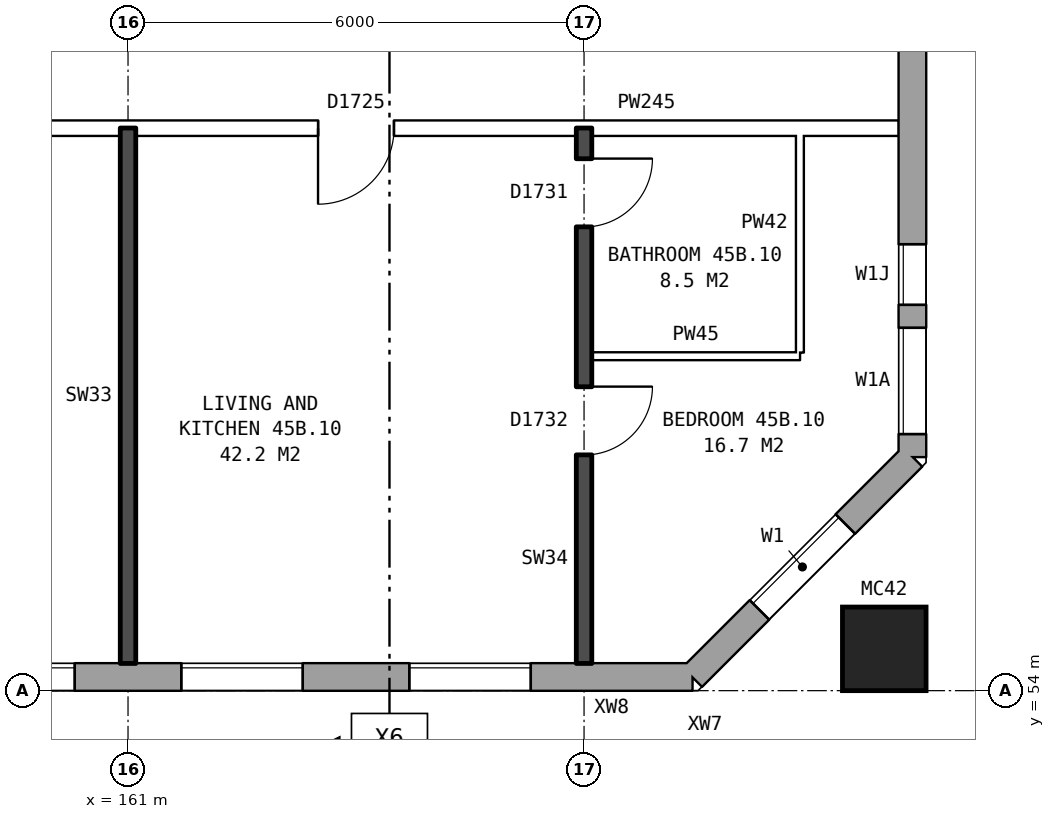
"""IFC4 building model, lengths in metres.
Left out: names, types, materials, properties, quantities, classifications, styles, units other than length and angle.
Written with IfcOpenShell. Run it as: python <this file> out.ifc"""

import sys

from ifc_helpers import new_model, si_unit, direction, frame, frame_2d, origin, origin_2d, place, context, subcontext, project, spatial, rectangle, hollow_rectangle, extrude, element, fill, save


model = new_model("IFC4")
c1 = context("Model", 3, precision=1e-05, world=origin(), true_north=direction((0.0, 1.0)))
c2 = subcontext(c1, "Body", "Model", "MODEL_VIEW")
j1 = project(units=[si_unit("LENGTHUNIT", "METRE"), si_unit("PLANEANGLEUNIT", "RADIAN")], contexts=[c1])
p1 = place(None, origin())
s1 = spatial("IfcSite", under=j1, at=p1, CompositionType="ELEMENT")
p2 = place(p1, origin())
s2 = spatial("IfcBuilding", under=s1, at=p2, CompositionType="ELEMENT")
p3 = place(p2, frame((0.0, 0.0, 160.9)))
s3 = spatial("IfcBuildingStorey", under=s2, at=p3, CompositionType="ELEMENT", Elevation=160.9)
p4 = place(p3, frame((170.95, 54.55, 0.0), z_axis=(0.0, 0.0, 1.0), x_axis=(1.0, 0.0, 0.0)))
e1 = element("IfcColumn", 1, at=p4, inside=s3, PredefinedType="COLUMN", context=c2, shape_type="SweptSolid", body=[
    extrude(hollow_rectangle(XDim=1.1, YDim=1.1, WallThickness=0.06, at=origin_2d()), origin(), (0.0, 0.0, 1.0), 3.1),
])
p5 = place(p3, frame((134.075, 54.18, 0.0), z_axis=(0.0, 0.0, 1.0), x_axis=(1.0, 0.0, 0.0)))
e2 = element("IfcWall", 2, at=p5, inside=s3, PredefinedType="STANDARD", context=c2, shape_type="SweptSolid", body=[
    extrude(rectangle(XDim=34.351, YDim=0.36, at=frame_2d((17.175, 0.0))), origin(), (0.0, 0.0, 1.0), 2.85),
])
p6 = place(p5, frame((0.625, 0.0, 0.8)))
e3 = element("IfcOpeningElement", 3, at=p6, cuts=e2, PredefinedType="OPENING", context=c2, shape_type="SweptSolid", body=[
    extrude(rectangle(XDim=1.6, YDim=1.8, at=frame_2d((0.8, 0.9))), frame((0.0, 0.19, 0.0), z_axis=(0.0, -1.0, 0.0), x_axis=(1.0, 0.0, 0.0)), (0.0, 0.0, 1.0), 0.38),
])
p7 = place(p5, frame((3.625, 0.0, 0.8)))
e4 = element("IfcOpeningElement", 4, at=p7, cuts=e2, PredefinedType="OPENING", context=c2, shape_type="SweptSolid", body=[
    extrude(rectangle(XDim=1.6, YDim=1.8, at=frame_2d((0.8, 0.9))), frame((0.0, 0.19, 0.0), z_axis=(0.0, -1.0, 0.0), x_axis=(1.0, 0.0, 0.0)), (0.0, 0.0, 1.0), 0.38),
])
p8 = place(p5, frame((6.625, 0.0, 0.8)))
e5 = element("IfcOpeningElement", 5, at=p8, cuts=e2, PredefinedType="OPENING", context=c2, shape_type="SweptSolid", body=[
    extrude(rectangle(XDim=1.6, YDim=1.8, at=frame_2d((0.8, 0.9))), frame((0.0, 0.19, 0.0), z_axis=(0.0, -1.0, 0.0), x_axis=(1.0, 0.0, 0.0)), (0.0, 0.0, 1.0), 0.38),
])
p9 = place(p5, frame((9.625, 0.0, 0.8)))
e6 = element("IfcOpeningElement", 6, at=p9, cuts=e2, PredefinedType="OPENING", context=c2, shape_type="SweptSolid", body=[
    extrude(rectangle(XDim=1.6, YDim=1.8, at=frame_2d((0.8, 0.9))), frame((0.0, 0.19, 0.0), z_axis=(0.0, -1.0, 0.0), x_axis=(1.0, 0.0, 0.0)), (0.0, 0.0, 1.0), 0.38),
])
p10 = place(p5, frame((12.625, 0.0, 0.15)))
e7 = element("IfcOpeningElement", 7, at=p10, cuts=e2, PredefinedType="OPENING", context=c2, shape_type="SweptSolid", body=[
    extrude(rectangle(XDim=0.8, YDim=0.9, at=frame_2d((0.4, 0.45))), frame((0.0, 0.19, 0.0), z_axis=(0.0, -1.0, 0.0), x_axis=(1.0, 0.0, 0.0)), (0.0, 0.0, 1.0), 0.38),
])
p11 = place(p5, frame((15.625, 0.0, 0.8)))
e8 = element("IfcOpeningElement", 8, at=p11, cuts=e2, PredefinedType="OPENING", context=c2, shape_type="SweptSolid", body=[
    extrude(rectangle(XDim=1.6, YDim=1.8, at=frame_2d((0.8, 0.9))), frame((0.0, 0.19, 0.0), z_axis=(0.0, -1.0, 0.0), x_axis=(1.0, 0.0, 0.0)), (0.0, 0.0, 1.0), 0.38),
])
p12 = place(p5, frame((18.625, 0.0, 0.8)))
e9 = element("IfcOpeningElement", 9, at=p12, cuts=e2, PredefinedType="OPENING", context=c2, shape_type="SweptSolid", body=[
    extrude(rectangle(XDim=1.6, YDim=1.8, at=frame_2d((0.8, 0.9))), frame((0.0, 0.19, 0.0), z_axis=(0.0, -1.0, 0.0), x_axis=(1.0, 0.0, 0.0)), (0.0, 0.0, 1.0), 0.38),
])
p13 = place(p5, frame((22.175, 0.0, 1.7)))
e10 = element("IfcOpeningElement", 10, at=p13, cuts=e2, PredefinedType="OPENING", context=c2, shape_type="SweptSolid", body=[
    extrude(rectangle(XDim=0.8, YDim=0.9, at=frame_2d((0.4, 0.45))), frame((0.0, 0.19, 0.0), z_axis=(0.0, -1.0, 0.0), x_axis=(1.0, 0.0, 0.0)), (0.0, 0.0, 1.0), 0.38),
])
p14 = place(p5, frame((24.625, 0.0, 0.8)))
e11 = element("IfcOpeningElement", 11, at=p14, cuts=e2, PredefinedType="OPENING", context=c2, shape_type="SweptSolid", body=[
    extrude(rectangle(XDim=1.6, YDim=1.8, at=frame_2d((0.8, 0.9))), frame((0.0, 0.19, 0.0), z_axis=(0.0, -1.0, 0.0), x_axis=(1.0, 0.0, 0.0)), (0.0, 0.0, 1.0), 0.38),
])
p15 = place(p5, frame((27.625, 0.0, 0.8)))
e12 = element("IfcOpeningElement", 12, at=p15, cuts=e2, PredefinedType="OPENING", context=c2, shape_type="SweptSolid", body=[
    extrude(rectangle(XDim=1.6, YDim=1.8, at=frame_2d((0.8, 0.9))), frame((0.0, 0.19, 0.0), z_axis=(0.0, -1.0, 0.0), x_axis=(1.0, 0.0, 0.0)), (0.0, 0.0, 1.0), 0.38),
])
p16 = place(p5, frame((30.625, 0.0, 0.8)))
e13 = element("IfcOpeningElement", 13, at=p16, cuts=e2, PredefinedType="OPENING", context=c2, shape_type="SweptSolid", body=[
    extrude(rectangle(XDim=1.6, YDim=1.8, at=frame_2d((0.8, 0.9))), frame((0.0, 0.19, 0.0), z_axis=(0.0, -1.0, 0.0), x_axis=(1.0, 0.0, 0.0)), (0.0, 0.0, 1.0), 0.38),
])
p17 = place(p5, frame((13.725, 0.0, 0.25)))
e14 = element("IfcOpeningElement", 14, at=p17, cuts=e2, PredefinedType="OPENING", context=c2, shape_type="SweptSolid", body=[
    extrude(rectangle(XDim=1.0, YDim=1.8, at=frame_2d((0.5, 0.9))), frame((0.0, 0.19, 0.0), z_axis=(0.0, -1.0, 0.0), x_axis=(1.0, 0.0, 0.0)), (0.0, 0.0, 1.0), 0.38),
])
p18 = place(p5, frame((23.275, 0.0, 0.8)))
e15 = element("IfcOpeningElement", 15, at=p18, cuts=e2, PredefinedType="OPENING", context=c2, shape_type="SweptSolid", body=[
    extrude(rectangle(XDim=1.0, YDim=1.8, at=frame_2d((0.5, 0.9))), frame((0.0, 0.19, 0.0), z_axis=(0.0, -1.0, 0.0), x_axis=(1.0, 0.0, 0.0)), (0.0, 0.0, 1.0), 0.38),
])
p19 = place(p3, frame((168.425, 54.18, 0.0), z_axis=(0.0, 0.0, 1.0), x_axis=(0.707106781187, 0.707106781187, 0.0)))
e16 = element("IfcWall", 16, at=p19, inside=s3, PredefinedType="STANDARD", context=c2, shape_type="SweptSolid", body=[
    extrude(rectangle(XDim=4.094, YDim=0.36, at=frame_2d((2.047, 0.0))), origin(), (0.0, 0.0, 1.0), 2.85),
])
p20 = place(p19, frame((1.247, 0.0, 0.8)))
e17 = element("IfcOpeningElement", 17, at=p20, cuts=e16, PredefinedType="OPENING", context=c2, shape_type="SweptSolid", body=[
    extrude(rectangle(XDim=1.6, YDim=1.8, at=frame_2d((0.8, 0.9))), frame((0.0, 0.19, 0.0), z_axis=(0.0, -1.0, 0.0), x_axis=(1.0, 0.0, 0.0)), (0.0, 0.0, 1.0), 0.38),
])
p21 = place(p3, frame((171.32, 57.075, 0.0), z_axis=(0.0, 0.0, 1.0), x_axis=(0.0, 1.0, 0.0)))
e18 = element("IfcWall", 18, at=p21, inside=s3, PredefinedType="STANDARD", context=c2, shape_type="SweptSolid", body=[
    extrude(rectangle(XDim=25.851, YDim=0.36, at=frame_2d((12.925, 0.0))), origin(), (0.0, 0.0, 1.0), 2.85),
])
p22 = place(p21, frame((0.3, 0.0, 0.8)))
e19 = element("IfcOpeningElement", 19, at=p22, cuts=e18, PredefinedType="OPENING", context=c2, shape_type="SweptSolid", body=[
    extrude(rectangle(XDim=1.4, YDim=1.8, at=frame_2d((0.7, 0.9))), frame((0.0, 0.19, 0.0), z_axis=(0.0, -1.0, 0.0), x_axis=(1.0, 0.0, 0.0)), (0.0, 0.0, 1.0), 0.38),
])
p23 = place(p21, frame((5.475, 0.0, 1.4)))
e20 = element("IfcOpeningElement", 20, at=p23, cuts=e18, PredefinedType="OPENING", context=c2, shape_type="SweptSolid", body=[
    extrude(rectangle(XDim=1.4, YDim=1.2, at=frame_2d((0.7, 0.6))), frame((0.0, 0.19, 0.0), z_axis=(0.0, -1.0, 0.0), x_axis=(1.0, 0.0, 0.0)), (0.0, 0.0, 1.0), 0.38),
])
p24 = place(p21, frame((7.625, 0.0, 0.8)))
e21 = element("IfcOpeningElement", 21, at=p24, cuts=e18, PredefinedType="OPENING", context=c2, shape_type="SweptSolid", body=[
    extrude(rectangle(XDim=1.6, YDim=1.8, at=frame_2d((0.8, 0.9))), frame((0.0, 0.19, 0.0), z_axis=(0.0, -1.0, 0.0), x_axis=(1.0, 0.0, 0.0)), (0.0, 0.0, 1.0), 0.38),
])
p25 = place(p21, frame((10.625, 0.0, 0.8)))
e22 = element("IfcOpeningElement", 22, at=p25, cuts=e18, PredefinedType="OPENING", context=c2, shape_type="SweptSolid", body=[
    extrude(rectangle(XDim=1.6, YDim=1.8, at=frame_2d((0.8, 0.9))), frame((0.0, 0.19, 0.0), z_axis=(0.0, -1.0, 0.0), x_axis=(1.0, 0.0, 0.0)), (0.0, 0.0, 1.0), 0.38),
])
p26 = place(p21, frame((13.625, 0.0, 0.8)))
e23 = element("IfcOpeningElement", 23, at=p26, cuts=e18, PredefinedType="OPENING", context=c2, shape_type="SweptSolid", body=[
    extrude(rectangle(XDim=1.6, YDim=1.8, at=frame_2d((0.8, 0.9))), frame((0.0, 0.19, 0.0), z_axis=(0.0, -1.0, 0.0), x_axis=(1.0, 0.0, 0.0)), (0.0, 0.0, 1.0), 0.38),
])
p27 = place(p21, frame((16.625, 0.0, 0.8)))
e24 = element("IfcOpeningElement", 24, at=p27, cuts=e18, PredefinedType="OPENING", context=c2, shape_type="SweptSolid", body=[
    extrude(rectangle(XDim=1.6, YDim=1.8, at=frame_2d((0.8, 0.9))), frame((0.0, 0.19, 0.0), z_axis=(0.0, -1.0, 0.0), x_axis=(1.0, 0.0, 0.0)), (0.0, 0.0, 1.0), 0.38),
])
p28 = place(p21, frame((9.525, 0.0, 0.8)))
e25 = element("IfcOpeningElement", 25, at=p28, cuts=e18, PredefinedType="OPENING", context=c2, shape_type="SweptSolid", body=[
    extrude(rectangle(XDim=0.8, YDim=1.8, at=frame_2d((0.4, 0.9))), frame((0.0, 0.19, 0.0), z_axis=(0.0, -1.0, 0.0), x_axis=(1.0, 0.0, 0.0)), (0.0, 0.0, 1.0), 0.38),
])
p29 = place(p21, frame((22.425, 0.0, 0.8)))
e26 = element("IfcOpeningElement", 26, at=p29, cuts=e18, PredefinedType="OPENING", context=c2, shape_type="SweptSolid", body=[
    extrude(rectangle(XDim=1.0, YDim=1.2, at=frame_2d((0.5, 0.6))), frame((0.0, 0.19, 0.0), z_axis=(0.0, -1.0, 0.0), x_axis=(1.0, 0.0, 0.0)), (0.0, 0.0, 1.0), 0.38),
])
p30 = place(p21, frame((2.0, 0.0, 0.8)))
e27 = element("IfcOpeningElement", 27, at=p30, cuts=e18, PredefinedType="OPENING", context=c2, shape_type="SweptSolid", body=[
    extrude(rectangle(XDim=0.8, YDim=1.5, at=frame_2d((0.4, 0.75))), frame((0.0, 0.19, 0.0), z_axis=(0.0, -1.0, 0.0), x_axis=(1.0, 0.0, 0.0)), (0.0, 0.0, 1.0), 0.38),
])
p31 = place(p21, frame((12.525, 0.0, 0.8)))
e28 = element("IfcOpeningElement", 28, at=p31, cuts=e18, PredefinedType="OPENING", context=c2, shape_type="SweptSolid", body=[
    extrude(rectangle(XDim=0.8, YDim=1.8, at=frame_2d((0.4, 0.9))), frame((0.0, 0.19, 0.0), z_axis=(0.0, -1.0, 0.0), x_axis=(1.0, 0.0, 0.0)), (0.0, 0.0, 1.0), 0.38),
])
p32 = place(p21, frame((15.525, 0.0, 0.8)))
e29 = element("IfcOpeningElement", 29, at=p32, cuts=e18, PredefinedType="OPENING", context=c2, shape_type="SweptSolid", body=[
    extrude(rectangle(XDim=0.8, YDim=1.8, at=frame_2d((0.4, 0.9))), frame((0.0, 0.19, 0.0), z_axis=(0.0, -1.0, 0.0), x_axis=(1.0, 0.0, 0.0)), (0.0, 0.0, 1.0), 0.38),
])
p33 = place(p21, frame((18.525, 0.0, 0.8)))
e30 = element("IfcOpeningElement", 30, at=p33, cuts=e18, PredefinedType="OPENING", context=c2, shape_type="SweptSolid", body=[
    extrude(rectangle(XDim=0.8, YDim=1.8, at=frame_2d((0.4, 0.9))), frame((0.0, 0.19, 0.0), z_axis=(0.0, -1.0, 0.0), x_axis=(1.0, 0.0, 0.0)), (0.0, 0.0, 1.0), 0.38),
])
p34 = place(p21, frame((23.725, 0.0, 0.8)))
e31 = element("IfcOpeningElement", 31, at=p34, cuts=e18, PredefinedType="OPENING", context=c2, shape_type="SweptSolid", body=[
    extrude(rectangle(XDim=1.4, YDim=1.8, at=frame_2d((0.7, 0.9))), frame((0.0, 0.19, 0.0), z_axis=(0.0, -1.0, 0.0), x_axis=(1.0, 0.0, 0.0)), (0.0, 0.0, 1.0), 0.38),
])
p35 = place(p3, frame((167.1, 58.4, 0.0), z_axis=(0.0, 0.0, 1.0), x_axis=(1.0, 0.0, 0.0)))
e32 = element("IfcWall", 32, at=p35, inside=s3, PredefinedType="PARTITIONING", context=c2, shape_type="SweptSolid", body=[
    extrude(rectangle(XDim=2.74, YDim=0.1, at=frame_2d((1.37, 0.0))), origin(), (0.0, 0.0, 1.0), 2.85),
])
p36 = place(p3, frame((155.1, 61.4, 0.0), z_axis=(0.0, 0.0, 1.0), x_axis=(1.0, 0.0, 0.0)))
e33 = element("IfcWall", 33, at=p36, inside=s3, PredefinedType="PARTITIONING", context=c2, shape_type="SweptSolid", body=[
    extrude(rectangle(XDim=16.04, YDim=0.2, at=frame_2d((8.02, 0.0))), origin(), (0.0, 0.0, 1.0), 2.85),
])
p37 = place(p36, frame((3.6, 0.0, 0.0)))
e34 = element("IfcOpeningElement", 34, at=p37, cuts=e33, PredefinedType="OPENING", context=c2, shape_type="SweptSolid", body=[
    extrude(rectangle(XDim=1.0, YDim=2.1, at=frame_2d((0.5, 1.05))), frame((0.0, 0.11, 0.0), z_axis=(0.0, -1.0, 0.0), x_axis=(1.0, 0.0, 0.0)), (0.0, 0.0, 1.0), 0.22),
])
p38 = place(p36, frame((8.4, 0.0, 0.0)))
e35 = element("IfcOpeningElement", 35, at=p38, cuts=e33, PredefinedType="OPENING", context=c2, shape_type="SweptSolid", body=[
    extrude(rectangle(XDim=1.0, YDim=2.1, at=frame_2d((0.5, 1.05))), frame((0.0, 0.11, 0.0), z_axis=(0.0, -1.0, 0.0), x_axis=(1.0, 0.0, 0.0)), (0.0, 0.0, 1.0), 0.22),
])
p39 = place(p3, frame((161.0, 54.36, 0.0), z_axis=(0.0, 0.0, 1.0), x_axis=(0.0, 1.0, 0.0)))
e36 = element("IfcWall", 36, at=p39, inside=s3, PredefinedType="SOLIDWALL", context=c2, shape_type="SweptSolid", body=[
    extrude(rectangle(XDim=7.04, YDim=0.2, at=frame_2d((3.52, 0.0))), origin(), (0.0, 0.0, 1.0), 2.85),
])
p40 = place(p3, frame((167.0, 54.36, 0.0), z_axis=(0.0, 0.0, 1.0), x_axis=(0.0, 1.0, 0.0)))
e37 = element("IfcWall", 37, at=p40, inside=s3, PredefinedType="SOLIDWALL", context=c2, shape_type="SweptSolid", body=[
    extrude(rectangle(XDim=7.04, YDim=0.2, at=frame_2d((3.52, 0.0))), origin(), (0.0, 0.0, 1.0), 2.85),
])
p41 = place(p40, frame((2.74, 0.0, 0.0)))
e38 = element("IfcOpeningElement", 38, at=p41, cuts=e37, PredefinedType="OPENING", context=c2, shape_type="SweptSolid", body=[
    extrude(rectangle(XDim=0.9, YDim=2.1, at=frame_2d((0.45, 1.05))), frame((0.0, 0.11, 0.0), z_axis=(0.0, -1.0, 0.0), x_axis=(1.0, 0.0, 0.0)), (0.0, 0.0, 1.0), 0.22),
])
p42 = place(p40, frame((5.74, 0.0, 0.0)))
e39 = element("IfcOpeningElement", 39, at=p42, cuts=e37, PredefinedType="OPENING", context=c2, shape_type="SweptSolid", body=[
    extrude(rectangle(XDim=0.9, YDim=2.1, at=frame_2d((0.45, 1.05))), frame((0.0, 0.11, 0.0), z_axis=(0.0, -1.0, 0.0), x_axis=(1.0, 0.0, 0.0)), (0.0, 0.0, 1.0), 0.22),
])
p43 = place(p3, frame((169.84, 58.45, 0.0), z_axis=(0.0, 0.0, 1.0), x_axis=(0.0, 1.0, 0.0)))
e40 = element("IfcWall", 40, at=p43, inside=s3, PredefinedType="PARTITIONING", context=c2, shape_type="SweptSolid", body=[
    extrude(rectangle(XDim=2.85, YDim=0.1, at=frame_2d((1.425, 0.0))), origin(), (0.0, 0.0, 1.0), 2.85),
])
p44 = place(p14, origin())
e41 = element("IfcWindow", 41, at=p44, inside=s3, PartitioningType="SINGLE_PANEL", PredefinedType="WINDOW", context=c2, shape_type="SweptSolid", body=[
    extrude(rectangle(XDim=1.6, YDim=1.8, at=frame_2d((0.8, 0.9))), frame((0.0, 0.15, 0.0), z_axis=(0.0, -1.0, 0.0), x_axis=(1.0, 0.0, 0.0)), (0.0, 0.0, 1.0), 0.06),
])
fill(e11, e41)
p45 = place(p15, origin())
e42 = element("IfcWindow", 42, at=p45, inside=s3, PartitioningType="SINGLE_PANEL", PredefinedType="WINDOW", context=c2, shape_type="SweptSolid", body=[
    extrude(rectangle(XDim=1.6, YDim=1.8, at=frame_2d((0.8, 0.9))), frame((0.0, 0.15, 0.0), z_axis=(0.0, -1.0, 0.0), x_axis=(1.0, 0.0, 0.0)), (0.0, 0.0, 1.0), 0.06),
])
fill(e12, e42)
p46 = place(p16, origin())
e43 = element("IfcWindow", 43, at=p46, inside=s3, PartitioningType="SINGLE_PANEL", PredefinedType="WINDOW", context=c2, shape_type="SweptSolid", body=[
    extrude(rectangle(XDim=1.6, YDim=1.8, at=frame_2d((0.8, 0.9))), frame((0.0, 0.15, 0.0), z_axis=(0.0, -1.0, 0.0), x_axis=(1.0, 0.0, 0.0)), (0.0, 0.0, 1.0), 0.06),
])
fill(e13, e43)
p47 = place(p20, origin())
e44 = element("IfcWindow", 44, at=p47, inside=s3, PartitioningType="SINGLE_PANEL", PredefinedType="WINDOW", context=c2, shape_type="SweptSolid", body=[
    extrude(rectangle(XDim=1.6, YDim=1.8, at=frame_2d((0.8, 0.9))), frame((0.0, 0.15, 0.0), z_axis=(0.0, -1.0, 0.0), x_axis=(1.0, 0.0, 0.0)), (0.0, 0.0, 1.0), 0.06),
])
fill(e17, e44)
p48 = place(p22, origin())
e45 = element("IfcWindow", 45, at=p48, inside=s3, PartitioningType="SINGLE_PANEL", PredefinedType="WINDOW", context=c2, shape_type="SweptSolid", body=[
    extrude(rectangle(XDim=1.4, YDim=1.8, at=frame_2d((0.7, 0.9))), frame((0.0, 0.15, 0.0), z_axis=(0.0, -1.0, 0.0), x_axis=(1.0, 0.0, 0.0)), (0.0, 0.0, 1.0), 0.06),
])
fill(e19, e45)
p49 = place(p41, frame((0.9, 0.0, 0.0), z_axis=(0.0, 0.0, 1.0), x_axis=(-1.0, 0.0, 0.0)))
e46 = element("IfcDoor", 46, at=p49, inside=s3, OperationType="SINGLE_SWING_LEFT", PredefinedType="DOOR", context=c2, shape_type="SweptSolid", body=[
    extrude(rectangle(XDim=0.9, YDim=2.1, at=frame_2d((0.45, 1.05))), frame((0.0, 0.025, 0.0), z_axis=(0.0, -1.0, 0.0), x_axis=(1.0, 0.0, 0.0)), (0.0, 0.0, 1.0), 0.05),
])
fill(e38, e46)
p50 = place(p38, frame((1.0, 0.0, 0.0), z_axis=(0.0, 0.0, 1.0), x_axis=(-1.0, 0.0, 0.0)))
e47 = element("IfcDoor", 47, at=p50, inside=s3, OperationType="SINGLE_SWING_RIGHT", PredefinedType="DOOR", context=c2, shape_type="SweptSolid", body=[
    extrude(rectangle(XDim=1.0, YDim=2.1, at=frame_2d((0.5, 1.05))), frame((0.0, 0.025, 0.0), z_axis=(0.0, -1.0, 0.0), x_axis=(1.0, 0.0, 0.0)), (0.0, 0.0, 1.0), 0.05),
])
fill(e35, e47)
p51 = place(p42, frame((0.9, 0.0, 0.0), z_axis=(0.0, 0.0, 1.0), x_axis=(-1.0, 0.0, 0.0)))
e48 = element("IfcDoor", 48, at=p51, inside=s3, OperationType="SINGLE_SWING_LEFT", PredefinedType="DOOR", context=c2, shape_type="SweptSolid", body=[
    extrude(rectangle(XDim=0.9, YDim=2.1, at=frame_2d((0.45, 1.05))), frame((0.0, 0.025, 0.0), z_axis=(0.0, -1.0, 0.0), x_axis=(1.0, 0.0, 0.0)), (0.0, 0.0, 1.0), 0.05),
])
fill(e39, e48)
p52 = place(p30, origin())
e49 = element("IfcWindow", 49, at=p52, inside=s3, PartitioningType="SINGLE_PANEL", PredefinedType="WINDOW", context=c2, shape_type="SweptSolid", body=[
    extrude(rectangle(XDim=0.8, YDim=1.5, at=frame_2d((0.4, 0.75))), frame((0.0, 0.15, 0.0), z_axis=(0.0, -1.0, 0.0), x_axis=(1.0, 0.0, 0.0)), (0.0, 0.0, 1.0), 0.06),
])
fill(e27, e49)
save(model, sys.argv[1])
